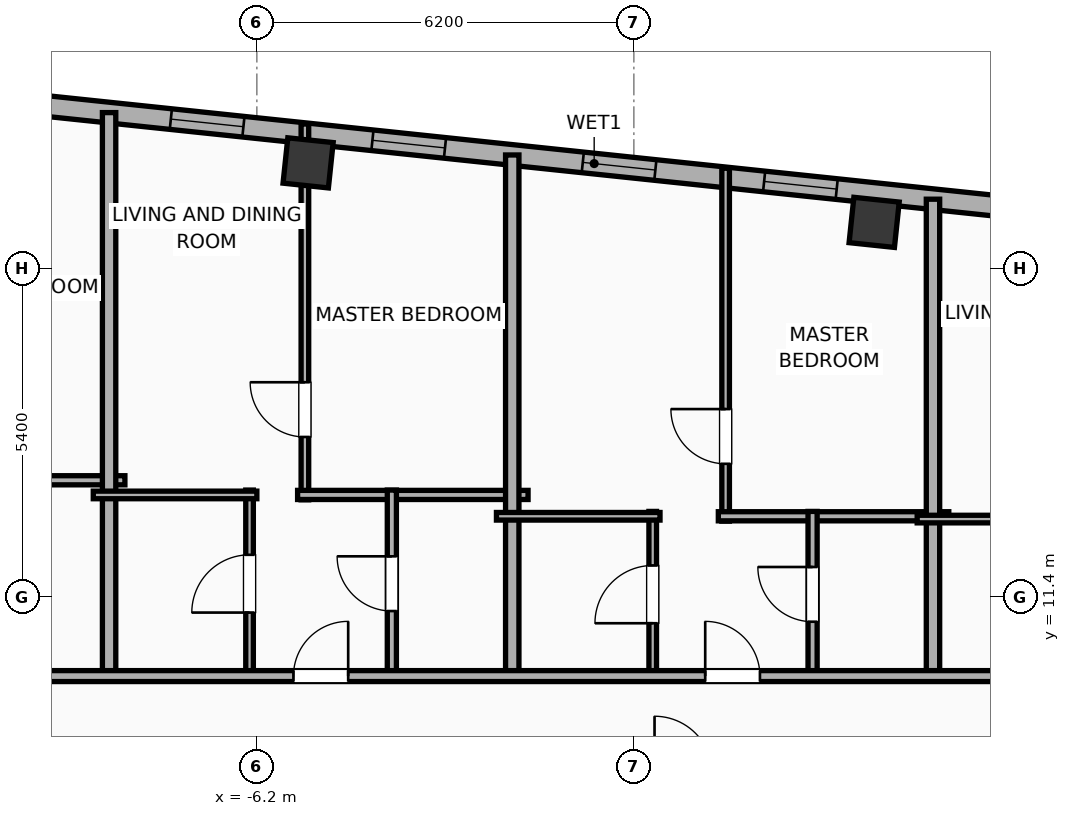
"""IFC4 building model, lengths in metres.
Left out: names, types, materials, properties, quantities, classifications, styles, units other than length and angle.
Written with IfcOpenShell. Run it as: python <this file> out.ifc"""

import sys

from ifc_helpers import new_model, si_unit, direction, frame, frame_2d, origin, origin_2d, place, context, subcontext, project, spatial, rectangle, hollow_rectangle, extrude, element, fill, save


model = new_model("IFC4")
c1 = context("Model", 3, precision=1e-05, world=origin(), true_north=direction((0.0, 1.0)))
c2 = subcontext(c1, "Body", "Model", "MODEL_VIEW")
j1 = project(units=[si_unit("LENGTHUNIT", "METRE"), si_unit("PLANEANGLEUNIT", "RADIAN")], contexts=[c1])
p1 = place(None, origin())
s1 = spatial("IfcSite", under=j1, at=p1, CompositionType="ELEMENT")
p2 = place(p1, origin())
s2 = spatial("IfcBuilding", under=s1, at=p2, CompositionType="ELEMENT")
p3 = place(p2, frame((0.0, 0.0, 271.7)))
s3 = spatial("IfcBuildingStorey", under=s2, at=p3, CompositionType="ELEMENT", Elevation=271.7)
for number, where, z_axis, x_axis in (
    (1, (3.952, 17.561, 0.0), (0.0, 0.0, 1.0), (0.995, -0.105, 0.0)),
    (2, (-5.357, 18.54, 0.0), (0.0, 0.0, 1.0), (0.995, -0.105, 0.0)),
):
    element("IfcColumn", number, at=place(p3, frame(where, z_axis=z_axis, x_axis=x_axis)), inside=s3, PredefinedType="COLUMN", context=c2, shape_type="SweptSolid", body=[
        extrude(hollow_rectangle(XDim=0.75, YDim=0.75, WallThickness=0.025, at=origin_2d()), origin(), (0.0, 0.0, 1.0), 3.9),
    ])
p4 = place(p3, frame((-23.908, 20.972, 0.0), z_axis=(0.0, 0.0, 1.0), x_axis=(0.994521888554, -0.104528528102, 0.0)))
e3 = element("IfcWall", 3, at=p4, inside=s3, PredefinedType="ELEMENTEDWALL", context=c2, shape_type="SweptSolid", body=[
    extrude(rectangle(XDim=46.766, YDim=0.34, at=frame_2d((23.383, 0.0))), origin(), (0.0, 0.0, 1.0), 3.65),
])
p5 = place(p4, frame((5.744, 0.0, 0.75)))
e4 = element("IfcOpeningElement", 4, at=p5, cuts=e3, PredefinedType="OPENING", context=c2, shape_type="SweptSolid", body=[
    extrude(rectangle(XDim=2.4, YDim=2.1, at=frame_2d((1.2, 1.05))), frame((0.0, 0.18, 0.0), z_axis=(0.0, -1.0, 0.0), x_axis=(1.0, 0.0, 0.0)), (0.0, 0.0, 1.0), 0.36),
])
p6 = place(p4, frame((3.05, 0.0, 0.75)))
e5 = element("IfcOpeningElement", 5, at=p6, cuts=e3, PredefinedType="OPENING", context=c2, shape_type="SweptSolid", body=[
    extrude(rectangle(XDim=1.2, YDim=2.05, at=frame_2d((0.6, 1.025))), frame((0.0, 0.18, 0.0), z_axis=(0.0, -1.0, 0.0), x_axis=(1.0, 0.0, 0.0)), (0.0, 0.0, 1.0), 0.36),
])
p7 = place(p4, frame((9.957, 0.0, 0.75)))
e6 = element("IfcOpeningElement", 6, at=p7, cuts=e3, PredefinedType="OPENING", context=c2, shape_type="SweptSolid", body=[
    extrude(rectangle(XDim=1.2, YDim=2.05, at=frame_2d((0.6, 1.025))), frame((0.0, 0.18, 0.0), z_axis=(0.0, -1.0, 0.0), x_axis=(1.0, 0.0, 0.0)), (0.0, 0.0, 1.0), 0.36),
])
p8 = place(p4, frame((13.05, 0.0, 0.75)))
e7 = element("IfcOpeningElement", 7, at=p8, cuts=e3, PredefinedType="OPENING", context=c2, shape_type="SweptSolid", body=[
    extrude(rectangle(XDim=1.2, YDim=2.05, at=frame_2d((0.6, 1.025))), frame((0.0, 0.18, 0.0), z_axis=(0.0, -1.0, 0.0), x_axis=(1.0, 0.0, 0.0)), (0.0, 0.0, 1.0), 0.36),
])
p9 = place(p4, frame((16.383, 0.0, 0.75)))
e8 = element("IfcOpeningElement", 8, at=p9, cuts=e3, PredefinedType="OPENING", context=c2, shape_type="SweptSolid", body=[
    extrude(rectangle(XDim=1.2, YDim=2.05, at=frame_2d((0.6, 1.025))), frame((0.0, 0.18, 0.0), z_axis=(0.0, -1.0, 0.0), x_axis=(1.0, 0.0, 0.0)), (0.0, 0.0, 1.0), 0.36),
])
p10 = place(p4, frame((19.716, 0.0, 0.75)))
e9 = element("IfcOpeningElement", 9, at=p10, cuts=e3, PredefinedType="OPENING", context=c2, shape_type="SweptSolid", body=[
    extrude(rectangle(XDim=1.2, YDim=2.05, at=frame_2d((0.6, 1.025))), frame((0.0, 0.18, 0.0), z_axis=(0.0, -1.0, 0.0), x_axis=(1.0, 0.0, 0.0)), (0.0, 0.0, 1.0), 0.36),
])
p11 = place(p4, frame((23.195, 0.0, 0.75)))
e10 = element("IfcOpeningElement", 10, at=p11, cuts=e3, PredefinedType="OPENING", context=c2, shape_type="SweptSolid", body=[
    extrude(rectangle(XDim=1.2, YDim=2.05, at=frame_2d((0.6, 1.025))), frame((0.0, 0.18, 0.0), z_axis=(0.0, -1.0, 0.0), x_axis=(1.0, 0.0, 0.0)), (0.0, 0.0, 1.0), 0.36),
])
p12 = place(p4, frame((26.194, 0.0, 0.75)))
e11 = element("IfcOpeningElement", 11, at=p12, cuts=e3, PredefinedType="OPENING", context=c2, shape_type="SweptSolid", body=[
    extrude(rectangle(XDim=1.2, YDim=2.05, at=frame_2d((0.6, 1.025))), frame((0.0, 0.18, 0.0), z_axis=(0.0, -1.0, 0.0), x_axis=(1.0, 0.0, 0.0)), (0.0, 0.0, 1.0), 0.36),
])
p13 = place(p4, frame((30.152, 0.0, 0.75)))
e12 = element("IfcOpeningElement", 12, at=p13, cuts=e3, PredefinedType="OPENING", context=c2, shape_type="SweptSolid", body=[
    extrude(rectangle(XDim=1.2, YDim=2.05, at=frame_2d((0.6, 1.025))), frame((0.0, 0.18, 0.0), z_axis=(0.0, -1.0, 0.0), x_axis=(1.0, 0.0, 0.0)), (0.0, 0.0, 1.0), 0.36),
])
p14 = place(p4, frame((33.631, 0.0, 0.75)))
e13 = element("IfcOpeningElement", 13, at=p14, cuts=e3, PredefinedType="OPENING", context=c2, shape_type="SweptSolid", body=[
    extrude(rectangle(XDim=1.2, YDim=2.05, at=frame_2d((0.6, 1.025))), frame((0.0, 0.18, 0.0), z_axis=(0.0, -1.0, 0.0), x_axis=(1.0, 0.0, 0.0)), (0.0, 0.0, 1.0), 0.36),
])
p15 = place(p4, frame((38.07, 0.0, 0.75)))
e14 = element("IfcOpeningElement", 14, at=p15, cuts=e3, PredefinedType="OPENING", context=c2, shape_type="SweptSolid", body=[
    extrude(rectangle(XDim=1.2, YDim=2.05, at=frame_2d((0.6, 1.025))), frame((0.0, 0.18, 0.0), z_axis=(0.0, -1.0, 0.0), x_axis=(1.0, 0.0, 0.0)), (0.0, 0.0, 1.0), 0.36),
])
p16 = place(p4, frame((40.589, 0.0, 0.75)))
e15 = element("IfcOpeningElement", 15, at=p16, cuts=e3, PredefinedType="OPENING", context=c2, shape_type="SweptSolid", body=[
    extrude(rectangle(XDim=1.2, YDim=2.05, at=frame_2d((0.6, 1.025))), frame((0.0, 0.18, 0.0), z_axis=(0.0, -1.0, 0.0), x_axis=(1.0, 0.0, 0.0)), (0.0, 0.0, 1.0), 0.36),
])
p17 = place(p4, frame((43.789, 0.0, 0.75)))
e16 = element("IfcOpeningElement", 16, at=p17, cuts=e3, PredefinedType="OPENING", context=c2, shape_type="SweptSolid", body=[
    extrude(rectangle(XDim=1.2, YDim=2.05, at=frame_2d((0.6, 1.025))), frame((0.0, 0.18, 0.0), z_axis=(0.0, -1.0, 0.0), x_axis=(1.0, 0.0, 0.0)), (0.0, 0.0, 1.0), 0.36),
])
p18 = place(p3, frame((-12.16, 13.32, 0.0), z_axis=(0.0, 0.0, 1.0), x_axis=(1.0, 0.0, 0.0)))
e17 = element("IfcWall", 17, at=p18, inside=s3, PredefinedType="PLUMBINGWALL", context=c2, shape_type="SweptSolid", body=[
    extrude(rectangle(XDim=3.79, YDim=0.15, at=frame_2d((1.895, 0.0))), origin(), (0.0, 0.0, 1.0), 3.65),
])
p19 = place(p3, frame((-8.63, 10.02, 0.0), z_axis=(0.0, 0.0, 1.0), x_axis=(0.0, 1.0, 0.0)))
e18 = element("IfcWall", 18, at=p19, inside=s3, PredefinedType="PARTITIONING", context=c2, shape_type="SweptSolid", body=[
    extrude(rectangle(XDim=9.346, YDim=0.22, at=frame_2d((4.673, 0.0))), origin(), (0.0, 0.0, 1.0), 3.65),
])
p20 = place(p3, frame((-5.41, 12.999, 0.0), z_axis=(0.0, 0.0, 1.0), x_axis=(0.0, 1.0, 0.0)))
e19 = element("IfcWall", 19, at=p20, inside=s3, PredefinedType="PARTITIONING", context=c2, shape_type="SweptSolid", body=[
    extrude(rectangle(XDim=6.18, YDim=0.125, at=frame_2d((3.09, 0.0))), origin(), (0.0, 0.0, 1.0), 3.09),
])
p21 = place(p20, frame((1.033, 0.0, 0.0)))
e20 = element("IfcOpeningElement", 20, at=p21, cuts=e19, PredefinedType="OPENING", context=c2, shape_type="SweptSolid", body=[
    extrude(rectangle(XDim=0.9, YDim=2.05, at=frame_2d((0.45, 1.025))), frame((0.0, 0.073, 0.0), z_axis=(0.0, -1.0, 0.0), x_axis=(1.0, 0.0, 0.0)), (0.0, 0.0, 1.0), 0.145),
])
p22 = place(p3, frame((-5.53, 13.079, 0.0), z_axis=(0.0, 0.0, 1.0), x_axis=(1.0, 0.0, 0.0)))
e21 = element("IfcWall", 21, at=p22, inside=s3, PredefinedType="PLUMBINGWALL", context=c2, shape_type="SweptSolid", body=[
    extrude(rectangle(XDim=3.79, YDim=0.15, at=frame_2d((1.895, 0.0))), origin(), (0.0, 0.0, 1.0), 3.65),
])
p23 = place(p3, frame((-6.32, 10.08, 0.0), z_axis=(0.0, 0.0, 1.0), x_axis=(0.0, 1.0, 0.0)))
e22 = element("IfcWall", 22, at=p23, inside=s3, PredefinedType="PARTITIONING", context=c2, shape_type="SweptSolid", body=[
    extrude(rectangle(XDim=3.079, YDim=0.125, at=frame_2d((1.54, 0.0))), origin(), (0.0, 0.0, 1.0), 3.65),
])
p24 = place(p23, frame((1.064, 0.0, 0.0)))
e23 = element("IfcOpeningElement", 23, at=p24, cuts=e22, PredefinedType="OPENING", context=c2, shape_type="SweptSolid", body=[
    extrude(rectangle(XDim=0.95, YDim=2.05, at=frame_2d((0.475, 1.025))), frame((0.0, 0.073, 0.0), z_axis=(0.0, -1.0, 0.0), x_axis=(1.0, 0.0, 0.0)), (0.0, 0.0, 1.0), 0.145),
])
p25 = place(p3, frame((-8.89, 13.079, 0.0), z_axis=(0.0, 0.0, 1.0), x_axis=(1.0, 0.0, 0.0)))
e24 = element("IfcWall", 24, at=p25, inside=s3, PredefinedType="PARTITIONING", context=c2, shape_type="SweptSolid", body=[
    extrude(rectangle(XDim=2.69, YDim=0.125, at=frame_2d((1.345, 0.0))), origin(), (0.0, 0.0, 1.0), 3.65),
])
p26 = place(p3, frame((-3.98, 10.08, 0.0), z_axis=(0.0, 0.0, 1.0), x_axis=(0.0, 1.0, 0.0)))
e25 = element("IfcWall", 25, at=p26, inside=s3, PredefinedType="PLUMBINGWALL", context=c2, shape_type="SweptSolid", body=[
    extrude(rectangle(XDim=3.079, YDim=0.15, at=frame_2d((1.54, 0.0))), origin(), (0.0, 0.0, 1.0), 3.65),
])
p27 = place(p26, frame((1.09, 0.0, 0.0)))
e26 = element("IfcOpeningElement", 26, at=p27, cuts=e25, PredefinedType="OPENING", context=c2, shape_type="SweptSolid", body=[
    extrude(rectangle(XDim=0.9, YDim=2.05, at=frame_2d((0.45, 1.025))), frame((0.0, 0.085, 0.0), z_axis=(0.0, -1.0, 0.0), x_axis=(1.0, 0.0, 0.0)), (0.0, 0.0, 1.0), 0.17),
])
p28 = place(p3, frame((-2.0, 10.02, 0.0), z_axis=(0.0, 0.0, 1.0), x_axis=(0.0, 1.0, 0.0)))
e27 = element("IfcWall", 27, at=p28, inside=s3, PredefinedType="PARTITIONING", context=c2, shape_type="SweptSolid", body=[
    extrude(rectangle(XDim=8.65, YDim=0.22, at=frame_2d((4.325, 0.0))), origin(), (0.0, 0.0, 1.0), 3.65),
])
p29 = place(p3, frame((1.509, 12.648, 0.0), z_axis=(0.0, 0.0, 1.0), x_axis=(0.0, 1.0, 0.0)))
e28 = element("IfcWall", 28, at=p29, inside=s3, PredefinedType="PARTITIONING", context=c2, shape_type="SweptSolid", body=[
    extrude(rectangle(XDim=5.804, YDim=0.125, at=frame_2d((2.902, 0.0))), origin(), (0.0, 0.0, 1.0), 3.65),
])
p30 = place(p29, frame((0.943, 0.0, 0.0)))
e29 = element("IfcOpeningElement", 29, at=p30, cuts=e28, PredefinedType="OPENING", context=c2, shape_type="SweptSolid", body=[
    extrude(rectangle(XDim=0.9, YDim=2.05, at=frame_2d((0.45, 1.025))), frame((0.0, 0.073, 0.0), z_axis=(0.0, -1.0, 0.0), x_axis=(1.0, 0.0, 0.0)), (0.0, 0.0, 1.0), 0.145),
])
p31 = place(p3, frame((1.389, 12.728, 0.0), z_axis=(0.0, 0.0, 1.0), x_axis=(1.0, 0.0, 0.0)))
e30 = element("IfcWall", 30, at=p31, inside=s3, PredefinedType="PLUMBINGWALL", context=c2, shape_type="SweptSolid", body=[
    extrude(rectangle(XDim=3.79, YDim=0.15, at=frame_2d((1.895, 0.0))), origin(), (0.0, 0.0, 1.0), 3.65),
])
p32 = place(p3, frame((0.31, 10.08, 0.0), z_axis=(0.0, 0.0, 1.0), x_axis=(0.0, 1.0, 0.0)))
e31 = element("IfcWall", 31, at=p32, inside=s3, PredefinedType="PARTITIONING", context=c2, shape_type="SweptSolid", body=[
    extrude(rectangle(XDim=2.728, YDim=0.125, at=frame_2d((1.364, 0.0))), origin(), (0.0, 0.0, 1.0), 3.65),
])
p33 = place(p32, frame((0.889, 0.0, 0.0)))
e32 = element("IfcOpeningElement", 32, at=p33, cuts=e31, PredefinedType="OPENING", context=c2, shape_type="SweptSolid", body=[
    extrude(rectangle(XDim=0.95, YDim=2.05, at=frame_2d((0.475, 1.025))), frame((0.0, 0.073, 0.0), z_axis=(0.0, -1.0, 0.0), x_axis=(1.0, 0.0, 0.0)), (0.0, 0.0, 1.0), 0.145),
])
p34 = place(p3, frame((-2.26, 12.728, 0.0), z_axis=(0.0, 0.0, 1.0), x_axis=(1.0, 0.0, 0.0)))
e33 = element("IfcWall", 33, at=p34, inside=s3, PredefinedType="PARTITIONING", context=c2, shape_type="SweptSolid", body=[
    extrude(rectangle(XDim=2.69, YDim=0.125, at=frame_2d((1.345, 0.0))), origin(), (0.0, 0.0, 1.0), 3.65),
])
p35 = place(p3, frame((2.939, 10.08, 0.0), z_axis=(0.0, 0.0, 1.0), x_axis=(0.0, 1.0, 0.0)))
e34 = element("IfcWall", 34, at=p35, inside=s3, PredefinedType="PLUMBINGWALL", context=c2, shape_type="SweptSolid", body=[
    extrude(rectangle(XDim=2.728, YDim=0.15, at=frame_2d((1.364, 0.0))), origin(), (0.0, 0.0, 1.0), 3.65),
])
p36 = place(p35, frame((0.914, 0.0, 0.0)))
e35 = element("IfcOpeningElement", 35, at=p36, cuts=e34, PredefinedType="OPENING", context=c2, shape_type="SweptSolid", body=[
    extrude(rectangle(XDim=0.9, YDim=2.05, at=frame_2d((0.45, 1.025))), frame((0.0, 0.085, 0.0), z_axis=(0.0, -1.0, 0.0), x_axis=(1.0, 0.0, 0.0)), (0.0, 0.0, 1.0), 0.17),
])
p37 = place(p3, frame((4.919, 10.02, 0.0), z_axis=(0.0, 0.0, 1.0), x_axis=(0.0, 1.0, 0.0)))
e36 = element("IfcWall", 36, at=p37, inside=s3, PredefinedType="PARTITIONING", context=c2, shape_type="SweptSolid", body=[
    extrude(rectangle(XDim=7.922, YDim=0.22, at=frame_2d((3.961, 0.0))), origin(), (0.0, 0.0, 1.0), 3.65),
])
p38 = place(p3, frame((4.659, 12.682, 0.0), z_axis=(0.0, 0.0, 1.0), x_axis=(1.0, 0.0, 0.0)))
e37 = element("IfcWall", 37, at=p38, inside=s3, PredefinedType="PARTITIONING", context=c2, shape_type="SweptSolid", body=[
    extrude(rectangle(XDim=2.69, YDim=0.125, at=frame_2d((1.345, 0.0))), origin(), (0.0, 0.0, 1.0), 3.65),
])
p39 = place(p3, frame((-28.516, 10.1, 0.0), z_axis=(0.0, 0.0, 1.0), x_axis=(1.0, 0.0, 0.0)))
e38 = element("IfcWall", 38, at=p39, inside=s3, PredefinedType="PARTITIONING", context=c2, shape_type="SweptSolid", body=[
    extrude(rectangle(XDim=53.955, YDim=0.18, at=frame_2d((26.978, 0.0))), origin(), (0.0, 0.0, 1.0), 3.65),
])
p40 = place(p39, frame((2.998, 0.0, 0.0)))
e39 = element("IfcOpeningElement", 39, at=p40, cuts=e38, PredefinedType="OPENING", context=c2, shape_type="SweptSolid", body=[
    extrude(rectangle(XDim=0.9, YDim=2.05, at=frame_2d((0.45, 1.025))), frame((0.0, 0.1, 0.0), z_axis=(0.0, -1.0, 0.0), x_axis=(1.0, 0.0, 0.0)), (0.0, 0.0, 1.0), 0.2),
])
p41 = place(p39, frame((9.656, 0.0, 0.0)))
e40 = element("IfcOpeningElement", 40, at=p41, cuts=e38, PredefinedType="OPENING", context=c2, shape_type="SweptSolid", body=[
    extrude(rectangle(XDim=0.9, YDim=2.05, at=frame_2d((0.45, 1.025))), frame((0.0, 0.1, 0.0), z_axis=(0.0, -1.0, 0.0), x_axis=(1.0, 0.0, 0.0)), (0.0, 0.0, 1.0), 0.2),
])
p42 = place(p39, frame((16.287, 0.0, 0.0)))
e41 = element("IfcOpeningElement", 41, at=p42, cuts=e38, PredefinedType="OPENING", context=c2, shape_type="SweptSolid", body=[
    extrude(rectangle(XDim=0.9, YDim=2.05, at=frame_2d((0.45, 1.025))), frame((0.0, 0.1, 0.0), z_axis=(0.0, -1.0, 0.0), x_axis=(1.0, 0.0, 0.0)), (0.0, 0.0, 1.0), 0.2),
])
p43 = place(p39, frame((22.918, 0.0, 0.0)))
e42 = element("IfcOpeningElement", 42, at=p43, cuts=e38, PredefinedType="OPENING", context=c2, shape_type="SweptSolid", body=[
    extrude(rectangle(XDim=0.9, YDim=2.05, at=frame_2d((0.45, 1.025))), frame((0.0, 0.1, 0.0), z_axis=(0.0, -1.0, 0.0), x_axis=(1.0, 0.0, 0.0)), (0.0, 0.0, 1.0), 0.2),
])
p44 = place(p39, frame((29.689, 0.0, 0.0)))
e43 = element("IfcOpeningElement", 43, at=p44, cuts=e38, PredefinedType="OPENING", context=c2, shape_type="SweptSolid", body=[
    extrude(rectangle(XDim=0.9, YDim=2.05, at=frame_2d((0.45, 1.025))), frame((0.0, 0.1, 0.0), z_axis=(0.0, -1.0, 0.0), x_axis=(1.0, 0.0, 0.0)), (0.0, 0.0, 1.0), 0.2),
])
p45 = place(p39, frame((36.612, 0.0, 0.0)))
e44 = element("IfcOpeningElement", 44, at=p45, cuts=e38, PredefinedType="OPENING", context=c2, shape_type="SweptSolid", body=[
    extrude(rectangle(XDim=0.9, YDim=2.05, at=frame_2d((0.45, 1.025))), frame((0.0, 0.1, 0.0), z_axis=(0.0, -1.0, 0.0), x_axis=(1.0, 0.0, 0.0)), (0.0, 0.0, 1.0), 0.2),
])
p46 = place(p39, frame((43.529, 0.0, 0.0)))
e45 = element("IfcOpeningElement", 45, at=p46, cuts=e38, PredefinedType="OPENING", context=c2, shape_type="SweptSolid", body=[
    extrude(rectangle(XDim=0.9, YDim=2.05, at=frame_2d((0.45, 1.025))), frame((0.0, 0.1, 0.0), z_axis=(0.0, -1.0, 0.0), x_axis=(1.0, 0.0, 0.0)), (0.0, 0.0, 1.0), 0.2),
])
p47 = place(p39, frame((50.452, 0.0, 0.0)))
e46 = element("IfcOpeningElement", 46, at=p47, cuts=e38, PredefinedType="OPENING", context=c2, shape_type="SweptSolid", body=[
    extrude(rectangle(XDim=0.9, YDim=2.05, at=frame_2d((0.45, 1.025))), frame((0.0, 0.1, 0.0), z_axis=(0.0, -1.0, 0.0), x_axis=(1.0, 0.0, 0.0)), (0.0, 0.0, 1.0), 0.2),
])
p48 = place(p9, origin())
e47 = element("IfcWindow", 47, at=p48, inside=s3, PartitioningType="SINGLE_PANEL", PredefinedType="WINDOW", context=c2, shape_type="SweptSolid", body=[
    extrude(rectangle(XDim=1.2, YDim=2.05, at=frame_2d((0.6, 1.025))), frame((0.0, 0.03, 0.0), z_axis=(0.0, -1.0, 0.0), x_axis=(1.0, 0.0, 0.0)), (0.0, 0.0, 1.0), 0.06),
])
fill(e8, e47)
p49 = place(p10, origin())
e48 = element("IfcWindow", 48, at=p49, inside=s3, PartitioningType="SINGLE_PANEL", PredefinedType="WINDOW", context=c2, shape_type="SweptSolid", body=[
    extrude(rectangle(XDim=1.2, YDim=2.05, at=frame_2d((0.6, 1.025))), frame((0.0, 0.03, 0.0), z_axis=(0.0, -1.0, 0.0), x_axis=(1.0, 0.0, 0.0)), (0.0, 0.0, 1.0), 0.06),
])
fill(e9, e48)
p50 = place(p11, origin())
e49 = element("IfcWindow", 49, at=p50, inside=s3, PartitioningType="SINGLE_PANEL", PredefinedType="WINDOW", context=c2, shape_type="SweptSolid", body=[
    extrude(rectangle(XDim=1.2, YDim=2.05, at=frame_2d((0.6, 1.025))), frame((0.0, 0.03, 0.0), z_axis=(0.0, -1.0, 0.0), x_axis=(1.0, 0.0, 0.0)), (0.0, 0.0, 1.0), 0.06),
])
fill(e10, e49)
p51 = place(p12, origin())
e50 = element("IfcWindow", 50, at=p51, inside=s3, PartitioningType="SINGLE_PANEL", PredefinedType="WINDOW", context=c2, shape_type="SweptSolid", body=[
    extrude(rectangle(XDim=1.2, YDim=2.05, at=frame_2d((0.6, 1.025))), frame((0.0, 0.03, 0.0), z_axis=(0.0, -1.0, 0.0), x_axis=(1.0, 0.0, 0.0)), (0.0, 0.0, 1.0), 0.06),
])
fill(e11, e50)
p52 = place(p21, origin())
e51 = element("IfcDoor", 51, at=p52, inside=s3, OperationType="SINGLE_SWING_RIGHT", PredefinedType="DOOR", context=c2, shape_type="SweptSolid", body=[
    extrude(rectangle(XDim=0.9, YDim=2.05, at=frame_2d((0.45, 1.025))), frame((0.0, 0.025, 0.0), z_axis=(0.0, -1.0, 0.0), x_axis=(1.0, 0.0, 0.0)), (0.0, 0.0, 1.0), 0.05),
])
fill(e20, e51)
p53 = place(p24, origin())
e52 = element("IfcDoor", 52, at=p53, inside=s3, OperationType="SINGLE_SWING_LEFT", PredefinedType="DOOR", context=c2, shape_type="SweptSolid", body=[
    extrude(rectangle(XDim=0.95, YDim=2.05, at=frame_2d((0.475, 1.025))), frame((0.0, 0.025, 0.0), z_axis=(0.0, -1.0, 0.0), x_axis=(1.0, 0.0, 0.0)), (0.0, 0.0, 1.0), 0.05),
])
fill(e23, e52)
p54 = place(p27, origin())
e53 = element("IfcDoor", 53, at=p54, inside=s3, OperationType="SINGLE_SWING_RIGHT", PredefinedType="DOOR", context=c2, shape_type="SweptSolid", body=[
    extrude(rectangle(XDim=0.9, YDim=2.05, at=frame_2d((0.45, 1.025))), frame((0.0, 0.025, 0.0), z_axis=(0.0, -1.0, 0.0), x_axis=(1.0, 0.0, 0.0)), (0.0, 0.0, 1.0), 0.05),
])
fill(e26, e53)
p55 = place(p30, origin())
e54 = element("IfcDoor", 54, at=p55, inside=s3, OperationType="SINGLE_SWING_RIGHT", PredefinedType="DOOR", context=c2, shape_type="SweptSolid", body=[
    extrude(rectangle(XDim=0.9, YDim=2.05, at=frame_2d((0.45, 1.025))), frame((0.0, 0.025, 0.0), z_axis=(0.0, -1.0, 0.0), x_axis=(1.0, 0.0, 0.0)), (0.0, 0.0, 1.0), 0.05),
])
fill(e29, e54)
p56 = place(p33, origin())
e55 = element("IfcDoor", 55, at=p56, inside=s3, OperationType="SINGLE_SWING_LEFT", PredefinedType="DOOR", context=c2, shape_type="SweptSolid", body=[
    extrude(rectangle(XDim=0.95, YDim=2.05, at=frame_2d((0.475, 1.025))), frame((0.0, 0.025, 0.0), z_axis=(0.0, -1.0, 0.0), x_axis=(1.0, 0.0, 0.0)), (0.0, 0.0, 1.0), 0.05),
])
fill(e32, e55)
p57 = place(p36, origin())
e56 = element("IfcDoor", 56, at=p57, inside=s3, OperationType="SINGLE_SWING_RIGHT", PredefinedType="DOOR", context=c2, shape_type="SweptSolid", body=[
    extrude(rectangle(XDim=0.9, YDim=2.05, at=frame_2d((0.45, 1.025))), frame((0.0, 0.025, 0.0), z_axis=(0.0, -1.0, 0.0), x_axis=(1.0, 0.0, 0.0)), (0.0, 0.0, 1.0), 0.05),
])
fill(e35, e56)
p58 = place(p43, origin())
e57 = element("IfcDoor", 57, at=p58, inside=s3, OperationType="SINGLE_SWING_RIGHT", PredefinedType="DOOR", context=c2, shape_type="SweptSolid", body=[
    extrude(rectangle(XDim=0.9, YDim=2.05, at=frame_2d((0.45, 1.025))), frame((0.0, 0.025, 0.0), z_axis=(0.0, -1.0, 0.0), x_axis=(1.0, 0.0, 0.0)), (0.0, 0.0, 1.0), 0.05),
])
fill(e42, e57)
p59 = place(p44, origin())
e58 = element("IfcDoor", 58, at=p59, inside=s3, OperationType="SINGLE_SWING_LEFT", PredefinedType="DOOR", context=c2, shape_type="SweptSolid", body=[
    extrude(rectangle(XDim=0.9, YDim=2.05, at=frame_2d((0.45, 1.025))), frame((0.0, 0.025, 0.0), z_axis=(0.0, -1.0, 0.0), x_axis=(1.0, 0.0, 0.0)), (0.0, 0.0, 1.0), 0.05),
])
fill(e43, e58)
save(model, sys.argv[1])
